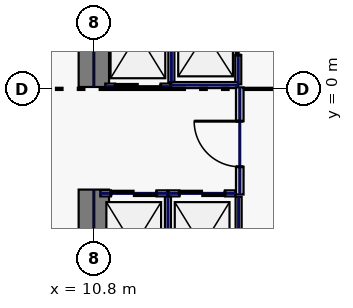
"""IFC4 building model, lengths in metres.
Left out: names, types, materials, properties, quantities, classifications, styles, units other than length and angle.
Written with IfcOpenShell. Run it as: python <this file> out.ifc"""

import sys

from ifc_helpers import new_model, si_unit, direction, frame, frame_2d, origin, place, context, subcontext, project, spatial, rectangle, extrude, element, fill, save


model = new_model("IFC4")
c1 = context("Model", 3, precision=1e-05, world=origin(), true_north=direction((0.0, 1.0)))
c2 = subcontext(c1, "Body", "Model", "MODEL_VIEW")
j1 = project(units=[si_unit("LENGTHUNIT", "METRE"), si_unit("PLANEANGLEUNIT", "RADIAN")], contexts=[c1])
p1 = place(None, origin())
s1 = spatial("IfcSite", under=j1, at=p1, CompositionType="ELEMENT")
p2 = place(p1, origin())
s2 = spatial("IfcBuilding", under=s1, at=p2, CompositionType="ELEMENT")
p3 = place(p2, frame((0.0, 0.0, -10.2)))
s3 = spatial("IfcBuildingStorey", under=s2, at=p3, CompositionType="ELEMENT", Elevation=-10.2)
p4 = place(p3, frame((10.8, -5.6, 0.0), z_axis=(0.0, 0.0, 1.0), x_axis=(0.0, 1.0, 0.0)))
e1 = element("IfcWall", 1, at=p4, inside=s3, PredefinedType="SHEAR", context=c2, shape_type="SweptSolid", body=[
    extrude(rectangle(XDim=2.95, YDim=0.8, at=frame_2d((1.475, 0.0))), origin(), (0.0, 0.0, 1.0), 4.45),
])
p5 = place(p3, frame((10.8, 0.05, 0.0), z_axis=(0.0, 0.0, 1.0), x_axis=(0.0, 1.0, 0.0)))
e2 = element("IfcWall", 2, at=p5, inside=s3, PredefinedType="SHEAR", context=c2, shape_type="SweptSolid", body=[
    extrude(rectangle(XDim=5.55, YDim=0.8, at=frame_2d((2.775, 0.0))), origin(), (0.0, 0.0, 1.0), 4.45),
])
p6 = place(p3, frame((14.6, 0.12, 0.0), z_axis=(0.0, 0.0, 1.0), x_axis=(0.0, 1.0, 0.0)))
e3 = element("IfcWall", 3, at=p6, inside=s3, PredefinedType="PARTITIONING", context=c2, shape_type="SweptSolid", body=[
    extrude(rectangle(XDim=2.74, YDim=0.16, at=frame_2d((1.37, 0.0))), origin(), (0.0, 0.0, 1.0), 4.45),
])
p7 = place(p6, frame((0.77, 0.0, 0.0)))
e4 = element("IfcOpeningElement", 4, at=p7, cuts=e3, PredefinedType="OPENING", context=c2, shape_type="SweptSolid", body=[
    extrude(rectangle(XDim=1.2, YDim=2.2, at=frame_2d((0.6, 1.1))), frame((0.0, 0.09, 0.0), z_axis=(0.0, -1.0, 0.0), x_axis=(1.0, 0.0, 0.0)), (0.0, 0.0, 1.0), 0.18),
])
p8 = place(p3, frame((12.84, 0.1, 0.0), z_axis=(0.0, 0.0, 1.0), x_axis=(1.0, 0.0, 0.0)))
e5 = element("IfcWall", 5, at=p8, inside=s3, PredefinedType="PARTITIONING", context=c2, shape_type="SweptSolid", body=[
    extrude(rectangle(XDim=1.76, YDim=0.16, at=frame_2d((0.88, 0.0))), origin(), (0.0, 0.0, 1.0), 4.45),
])
p9 = place(p3, frame((12.84, 0.18, 0.0), z_axis=(0.0, 0.0, 1.0), x_axis=(0.0, 1.0, 0.0)))
e6 = element("IfcWall", 6, at=p9, inside=s3, PredefinedType="PARTITIONING", context=c2, shape_type="SweptSolid", body=[
    extrude(rectangle(XDim=2.62, YDim=0.16, at=frame_2d((1.31, 0.0))), origin(), (0.0, 0.0, 1.0), 4.45),
])
p10 = place(p3, frame((12.77, -2.75, 0.0), z_axis=(0.0, 0.0, 1.0), x_axis=(1.0, 0.0, 0.0)))
e7 = element("IfcWall", 7, at=p10, inside=s3, PredefinedType="PARTITIONING", context=c2, shape_type="SweptSolid", body=[
    extrude(rectangle(XDim=1.76, YDim=0.16, at=frame_2d((0.88, 0.0))), origin(), (0.0, 0.0, 1.0), 4.45),
])
p11 = place(p10, frame((0.28, 0.0, 0.0)))
e8 = element("IfcOpeningElement", 8, at=p11, cuts=e7, PredefinedType="OPENING", context=c2, shape_type="SweptSolid", body=[
    extrude(rectangle(XDim=1.2, YDim=2.2, at=frame_2d((0.6, 1.1))), frame((0.0, 0.09, 0.0), z_axis=(0.0, -1.0, 0.0), x_axis=(1.0, 0.0, 0.0)), (0.0, 0.0, 1.0), 0.18),
])
for number, where, z_axis, x_axis in (
    (9, (12.75, -5.54, 0.0), (0.0, 0.0, 1.0), (0.0, 1.0, 0.0)),
    (10, (14.61, -5.54, 0.0), (0.0, 0.0, 1.0), (0.0, 1.0, 0.0)),
):
    element("IfcWall", number, at=place(p3, frame(where, z_axis=z_axis, x_axis=x_axis)), inside=s3, PredefinedType="PARTITIONING", context=c2, shape_type="SweptSolid", body=[
        extrude(rectangle(XDim=2.7, YDim=0.16, at=frame_2d((1.35, 0.0))), origin(), (0.0, 0.0, 1.0), 4.45),
    ])
p12 = place(p3, frame((10.97, -2.75, 0.0), z_axis=(0.0, 0.0, 1.0), x_axis=(1.0, 0.0, 0.0)))
e11 = element("IfcWall", 11, at=p12, inside=s3, PredefinedType="PARTITIONING", context=c2, shape_type="SweptSolid", body=[
    extrude(rectangle(XDim=1.76, YDim=0.16, at=frame_2d((0.88, 0.0))), origin(), (0.0, 0.0, 1.0), 4.45),
])
p13 = place(p12, frame((0.28, 0.0, 0.0)))
e12 = element("IfcOpeningElement", 12, at=p13, cuts=e11, PredefinedType="OPENING", context=c2, shape_type="SweptSolid", body=[
    extrude(rectangle(XDim=1.2, YDim=2.2, at=frame_2d((0.6, 1.1))), frame((0.0, 0.09, 0.0), z_axis=(0.0, -1.0, 0.0), x_axis=(1.0, 0.0, 0.0)), (0.0, 0.0, 1.0), 0.18),
])
p14 = place(p3, frame((11.1, 0.06, 0.0), z_axis=(0.0, 0.0, 1.0), x_axis=(1.0, 0.0, 0.0)))
e13 = element("IfcWall", 13, at=p14, inside=s3, PredefinedType="PARTITIONING", context=c2, shape_type="SweptSolid", body=[
    extrude(rectangle(XDim=1.72, YDim=0.16, at=frame_2d((0.86, 0.0))), origin(), (0.0, 0.0, 1.0), 4.45),
])
p15 = place(p14, frame((0.26, 0.0, 0.0)))
e14 = element("IfcOpeningElement", 14, at=p15, cuts=e13, PredefinedType="OPENING", context=c2, shape_type="SweptSolid", body=[
    extrude(rectangle(XDim=1.2, YDim=2.2, at=frame_2d((0.6, 1.1))), frame((0.0, 0.09, 0.0), z_axis=(0.0, -1.0, 0.0), x_axis=(1.0, 0.0, 0.0)), (0.0, 0.0, 1.0), 0.18),
])
p16 = place(p3, frame((14.64, -2.78, 0.0), z_axis=(0.0, 0.0, 1.0), x_axis=(0.0, 1.0, 0.0)))
e15 = element("IfcWall", 15, at=p16, inside=s3, PredefinedType="SOLIDWALL", context=c2, shape_type="SweptSolid", body=[
    extrude(rectangle(XDim=2.82, YDim=0.2, at=frame_2d((1.41, 0.0))), origin(), (0.0, 0.0, 1.0), 4.45),
])
p17 = place(p16, frame((0.73, 0.0, 0.0)))
e16 = element("IfcOpeningElement", 16, at=p17, cuts=e15, PredefinedType="OPENING", context=c2, shape_type="SweptSolid", body=[
    extrude(rectangle(XDim=1.2, YDim=2.2, at=frame_2d((0.6, 1.1))), frame((0.0, 0.11, 0.0), z_axis=(0.0, -1.0, 0.0), x_axis=(1.0, 0.0, 0.0)), (0.0, 0.0, 1.0), 0.22),
])
p18 = place(p7, origin())
e17 = element("IfcDoor", 17, at=p18, inside=s3, OperationType="SLIDING_TO_LEFT", PredefinedType="DOOR", context=c2, shape_type="SweptSolid", body=[
    extrude(rectangle(XDim=1.2, YDim=2.2, at=frame_2d((0.6, 1.1))), frame((0.0, 0.025, 0.0), z_axis=(0.0, -1.0, 0.0), x_axis=(1.0, 0.0, 0.0)), (0.0, 0.0, 1.0), 0.05),
])
fill(e4, e17)
p19 = place(p11, origin())
e18 = element("IfcDoor", 18, at=p19, inside=s3, OperationType="SLIDING_TO_LEFT", PredefinedType="DOOR", context=c2, shape_type="SweptSolid", body=[
    extrude(rectangle(XDim=1.2, YDim=2.2, at=frame_2d((0.6, 1.1))), frame((0.0, 0.025, 0.0), z_axis=(0.0, -1.0, 0.0), x_axis=(1.0, 0.0, 0.0)), (0.0, 0.0, 1.0), 0.05),
])
fill(e8, e18)
p20 = place(p13, origin())
e19 = element("IfcDoor", 19, at=p20, inside=s3, OperationType="SLIDING_TO_LEFT", PredefinedType="DOOR", context=c2, shape_type="SweptSolid", body=[
    extrude(rectangle(XDim=1.2, YDim=2.2, at=frame_2d((0.6, 1.1))), frame((0.0, 0.025, 0.0), z_axis=(0.0, -1.0, 0.0), x_axis=(1.0, 0.0, 0.0)), (0.0, 0.0, 1.0), 0.05),
])
fill(e12, e19)
p21 = place(p15, origin())
e20 = element("IfcDoor", 20, at=p21, inside=s3, OperationType="SLIDING_TO_LEFT", PredefinedType="DOOR", context=c2, shape_type="SweptSolid", body=[
    extrude(rectangle(XDim=1.2, YDim=2.2, at=frame_2d((0.6, 1.1))), frame((0.0, 0.025, 0.0), z_axis=(0.0, -1.0, 0.0), x_axis=(1.0, 0.0, 0.0)), (0.0, 0.0, 1.0), 0.05),
])
fill(e14, e20)
p22 = place(p17, origin())
e21 = element("IfcDoor", 21, at=p22, inside=s3, OperationType="SINGLE_SWING_RIGHT", PredefinedType="DOOR", context=c2, shape_type="SweptSolid", body=[
    extrude(rectangle(XDim=1.2, YDim=2.2, at=frame_2d((0.6, 1.1))), frame((0.0, 0.025, 0.0), z_axis=(0.0, -1.0, 0.0), x_axis=(1.0, 0.0, 0.0)), (0.0, 0.0, 1.0), 0.05),
])
fill(e16, e21)
save(model, sys.argv[1])
